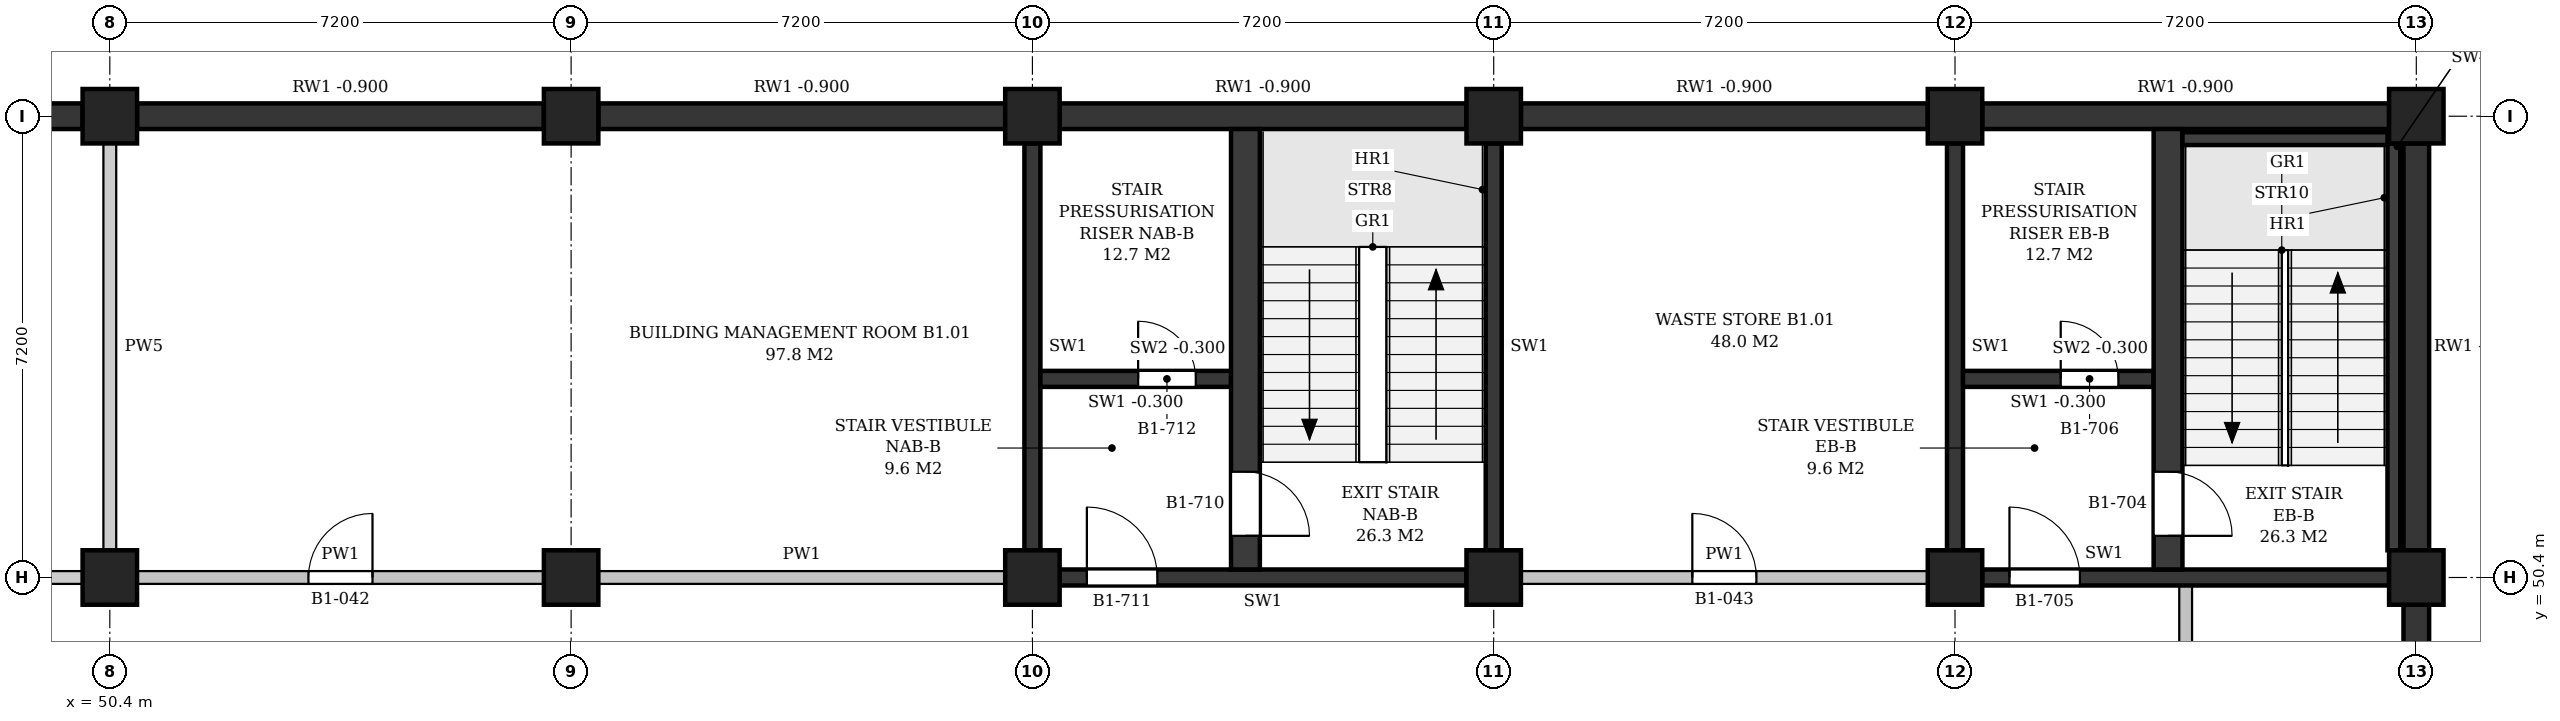
"""IFC4 building model, lengths in metres.
Left out: names, types, materials, properties, quantities, classifications, styles, units other than length and angle.
Written with IfcOpenShell. Run it as: python <this file> out.ifc"""

import sys

from ifc_helpers import new_model, si_unit, direction, frame, frame_2d, origin, origin_2d, place, context, subcontext, project, spatial, polyline, rectangle, outline, extrude, element, fill, save


model = new_model("IFC4")
c1 = context("Model", 3, precision=1e-05, world=origin(), true_north=direction((0.0, 1.0)))
c2 = subcontext(c1, "Body", "Model", "MODEL_VIEW")
j1 = project(units=[si_unit("LENGTHUNIT", "METRE"), si_unit("PLANEANGLEUNIT", "RADIAN")], contexts=[c1])
p1 = place(None, origin())
s1 = spatial("IfcSite", under=j1, at=p1, CompositionType="ELEMENT")
p2 = place(p1, origin())
s2 = spatial("IfcBuilding", under=s1, at=p2, CompositionType="ELEMENT")
p3 = place(p2, frame((0.0, 0.0, -4.5)))
s3 = spatial("IfcBuildingStorey", under=s2, at=p3, CompositionType="ELEMENT", Elevation=-4.5)
for number, where, z_axis, x_axis in (
    (1, (50.4, 50.4, 0.0), (0.0, 0.0, 1.0), (1.0, 0.0, 0.0)),
    (2, (50.4, 57.6, 0.0), (0.0, 0.0, 1.0), (1.0, 0.0, 0.0)),
    (3, (57.6, 50.4, 0.0), (0.0, 0.0, 1.0), (1.0, 0.0, 0.0)),
    (4, (57.6, 57.6, 0.0), (0.0, 0.0, 1.0), (1.0, 0.0, 0.0)),
    (5, (64.8, 50.4, 0.0), (0.0, 0.0, 1.0), (1.0, 0.0, 0.0)),
    (6, (64.8, 57.6, 0.0), (0.0, 0.0, 1.0), (1.0, 0.0, 0.0)),
    (7, (72.0, 50.4, 0.0), (0.0, 0.0, 1.0), (1.0, 0.0, 0.0)),
    (8, (72.0, 57.6, 0.0), (0.0, 0.0, 1.0), (1.0, 0.0, 0.0)),
    (9, (79.2, 50.4, 0.0), (0.0, 0.0, 1.0), (1.0, 0.0, 0.0)),
    (10, (79.2, 57.6, 0.0), (0.0, 0.0, 1.0), (1.0, 0.0, 0.0)),
    (11, (86.4, 50.4, 0.0), (0.0, 0.0, 1.0), (1.0, 0.0, 0.0)),
    (12, (86.4, 57.6, 0.0), (0.0, 0.0, 1.0), (1.0, 0.0, 0.0)),
):
    element("IfcColumn", number, at=place(p3, frame(where, z_axis=z_axis, x_axis=x_axis)), inside=s3, PredefinedType="COLUMN", context=c2, shape_type="SweptSolid", body=[
        extrude(rectangle(XDim=0.85, YDim=0.85, at=origin_2d()), origin(), (0.0, 0.0, 1.0), 4.5),
    ])
for number, where, z_axis, x_axis in (
    (13, (86.4, 43.625, 0.0), (0.0, 0.0, 1.0), (0.0, 1.0, 0.0)),
    (14, (86.4, 50.825, 0.0), (0.0, 0.0, 1.0), (0.0, 1.0, 0.0)),
    (15, (85.975, 57.6, 0.0), (0.0, 0.0, 1.0), (-1.0, 0.0, 0.0)),
):
    element("IfcWall", number, at=place(p3, frame(where, z_axis=z_axis, x_axis=x_axis)), inside=s3, PredefinedType="SOLIDWALL", context=c2, shape_type="SweptSolid", body=[
        extrude(rectangle(XDim=6.35, YDim=0.4, at=frame_2d((3.175, 0.0))), origin(), (0.0, 0.0, 1.0), 3.6),
    ])
for number, where, z_axis, x_axis in (
    (16, (78.775, 57.6, 0.0), (0.0, 0.0, 1.0), (-1.0, 0.0, 0.0)),
    (17, (71.575, 57.6, 0.0), (0.0, 0.0, 1.0), (-1.0, 0.0, 0.0)),
):
    element("IfcWall", number, at=place(p3, frame(where, z_axis=z_axis, x_axis=x_axis)), inside=s3, PredefinedType="SOLIDWALL", context=c2, shape_type="SweptSolid", body=[
        extrude(rectangle(XDim=6.35, YDim=0.4, at=frame_2d((3.175, 0.0))), origin(), (0.0, 0.0, 1.0), 3.6),
    ])
for number, where, z_axis, x_axis in (
    (18, (64.375, 57.6, 0.0), (0.0, 0.0, 1.0), (-1.0, 0.0, 0.0)),
    (19, (57.175, 57.6, 0.0), (0.0, 0.0, 1.0), (-1.0, 0.0, 0.0)),
    (20, (49.975, 57.6, 0.0), (0.0, 0.0, 1.0), (-1.0, 0.0, 0.0)),
):
    element("IfcWall", number, at=place(p3, frame(where, z_axis=z_axis, x_axis=x_axis)), inside=s3, PredefinedType="SOLIDWALL", context=c2, shape_type="SweptSolid", body=[
        extrude(rectangle(XDim=6.35, YDim=0.4, at=frame_2d((3.175, 0.0))), origin(), (0.0, 0.0, 1.0), 3.6),
    ])
p4 = place(p3, frame((79.625, 50.4, 0.0), z_axis=(0.0, 0.0, 1.0), x_axis=(1.0, 0.0, 0.0)))
e21 = element("IfcWall", 21, at=p4, inside=s3, PredefinedType="SHEAR", context=c2, shape_type="SweptSolid", body=[
    extrude(rectangle(XDim=6.35, YDim=0.25, at=frame_2d((3.175, 0.0))), origin(), (0.0, 0.0, 1.0), 3.4),
])
p5 = place(p4, frame((0.425, 0.0, 0.0)))
e22 = element("IfcOpeningElement", 22, at=p5, cuts=e21, PredefinedType="OPENING", context=c2, shape_type="SweptSolid", body=[
    extrude(rectangle(XDim=1.1, YDim=2.1, at=frame_2d((0.55, 1.05))), frame((0.0, 0.135, 0.0), z_axis=(0.0, -1.0, 0.0), x_axis=(1.0, 0.0, 0.0)), (0.0, 0.0, 1.0), 0.27),
])
p6 = place(p3, frame((79.2, 50.825, 0.0), z_axis=(0.0, 0.0, 1.0), x_axis=(0.0, 1.0, 0.0)))
e23 = element("IfcWall", 23, at=p6, inside=s3, PredefinedType="SHEAR", context=c2, shape_type="SweptSolid", body=[
    extrude(rectangle(XDim=6.35, YDim=0.25, at=frame_2d((3.175, 0.0))), origin(), (0.0, 0.0, 1.0), 3.4),
])
p7 = place(p3, frame((86.05, 50.825, 0.0), z_axis=(0.0, 0.0, 1.0), x_axis=(0.0, 1.0, 0.0)))
e24 = element("IfcWall", 24, at=p7, inside=s3, PredefinedType="SHEAR", context=c2, shape_type="SweptSolid", body=[
    extrude(rectangle(XDim=6.35, YDim=0.2, at=frame_2d((3.175, 0.0))), origin(), (0.0, 0.0, 1.0), 4.2),
])
p8 = place(p3, frame((82.75, 57.25, 0.0), z_axis=(0.0, 0.0, 1.0), x_axis=(1.0, 0.0, 0.0)))
e25 = element("IfcWall", 25, at=p8, inside=s3, PredefinedType="SHEAR", context=c2, shape_type="SweptSolid", body=[
    extrude(rectangle(XDim=3.2, YDim=0.2, at=frame_2d((1.6, 0.0))), origin(), (0.0, 0.0, 1.0), 4.2),
])
p9 = place(p3, frame((82.525, 50.525, 0.0), z_axis=(0.0, 0.0, 1.0), x_axis=(0.0, 1.0, 0.0)))
e26 = element("IfcWall", 26, at=p9, inside=s3, PredefinedType="SHEAR", context=c2, shape_type="SweptSolid", body=[
    extrude(rectangle(XDim=6.875, YDim=0.45, at=frame_2d((3.438, 0.0))), origin(), (0.0, 0.0, 1.0), 4.2),
])
p10 = place(p9, frame((0.525, 0.0, 0.0)))
e27 = element("IfcOpeningElement", 27, at=p10, cuts=e26, PredefinedType="OPENING", context=c2, shape_type="SweptSolid", body=[
    extrude(rectangle(XDim=1.0, YDim=2.1, at=frame_2d((0.5, 1.05))), frame((0.0, 0.235, 0.0), z_axis=(0.0, -1.0, 0.0), x_axis=(1.0, 0.0, 0.0)), (0.0, 0.0, 1.0), 0.47),
])
p11 = place(p3, frame((79.325, 53.5, 0.0), z_axis=(0.0, 0.0, 1.0), x_axis=(1.0, 0.0, 0.0)))
e28 = element("IfcWall", 28, at=p11, inside=s3, PredefinedType="SHEAR", context=c2, shape_type="SweptSolid", body=[
    extrude(rectangle(XDim=2.975, YDim=0.25, at=frame_2d((1.488, 0.0))), origin(), (0.0, 0.0, 1.0), 4.2),
])
p12 = place(p11, frame((1.525, 0.0, 0.0)))
e29 = element("IfcOpeningElement", 29, at=p12, cuts=e28, PredefinedType="OPENING", context=c2, shape_type="SweptSolid", body=[
    extrude(rectangle(XDim=0.9, YDim=2.1, at=frame_2d((0.45, 1.05))), frame((0.0, 0.135, 0.0), z_axis=(0.0, -1.0, 0.0), x_axis=(1.0, 0.0, 0.0)), (0.0, 0.0, 1.0), 0.27),
])
p13 = place(p3, frame((65.225, 50.4, 0.0), z_axis=(0.0, 0.0, 1.0), x_axis=(1.0, 0.0, 0.0)))
e30 = element("IfcWall", 30, at=p13, inside=s3, PredefinedType="SHEAR", context=c2, shape_type="SweptSolid", body=[
    extrude(rectangle(XDim=6.35, YDim=0.25, at=frame_2d((3.175, 0.0))), origin(), (0.0, 0.0, 1.0), 3.4),
])
p14 = place(p13, frame((0.425, 0.0, 0.0)))
e31 = element("IfcOpeningElement", 31, at=p14, cuts=e30, PredefinedType="OPENING", context=c2, shape_type="SweptSolid", body=[
    extrude(rectangle(XDim=1.1, YDim=2.1, at=frame_2d((0.55, 1.05))), frame((0.0, 0.135, 0.0), z_axis=(0.0, -1.0, 0.0), x_axis=(1.0, 0.0, 0.0)), (0.0, 0.0, 1.0), 0.27),
])
for number, where, z_axis, x_axis in (
    (32, (72.0, 50.825, 0.0), (0.0, 0.0, 1.0), (0.0, 1.0, 0.0)),
    (33, (64.8, 50.825, 0.0), (0.0, 0.0, 1.0), (0.0, 1.0, 0.0)),
):
    element("IfcWall", number, at=place(p3, frame(where, z_axis=z_axis, x_axis=x_axis)), inside=s3, PredefinedType="SHEAR", context=c2, shape_type="SweptSolid", body=[
        extrude(rectangle(XDim=6.35, YDim=0.25, at=frame_2d((3.175, 0.0))), origin(), (0.0, 0.0, 1.0), 3.4),
    ])
p15 = place(p3, frame((68.125, 50.525, 0.0), z_axis=(0.0, 0.0, 1.0), x_axis=(0.0, 1.0, 0.0)))
e34 = element("IfcWall", 34, at=p15, inside=s3, PredefinedType="SHEAR", context=c2, shape_type="SweptSolid", body=[
    extrude(rectangle(XDim=6.875, YDim=0.45, at=frame_2d((3.438, 0.0))), origin(), (0.0, 0.0, 1.0), 4.2),
])
p16 = place(p15, frame((0.525, 0.0, 0.0)))
e35 = element("IfcOpeningElement", 35, at=p16, cuts=e34, PredefinedType="OPENING", context=c2, shape_type="SweptSolid", body=[
    extrude(rectangle(XDim=1.0, YDim=2.1, at=frame_2d((0.5, 1.05))), frame((0.0, 0.235, 0.0), z_axis=(0.0, -1.0, 0.0), x_axis=(1.0, 0.0, 0.0)), (0.0, 0.0, 1.0), 0.47),
])
p17 = place(p3, frame((64.925, 53.5, 0.0), z_axis=(0.0, 0.0, 1.0), x_axis=(1.0, 0.0, 0.0)))
e36 = element("IfcWall", 36, at=p17, inside=s3, PredefinedType="SHEAR", context=c2, shape_type="SweptSolid", body=[
    extrude(rectangle(XDim=2.975, YDim=0.25, at=frame_2d((1.487, 0.0))), origin(), (0.0, 0.0, 1.0), 4.2),
])
p18 = place(p17, frame((1.525, 0.0, 0.0)))
e37 = element("IfcOpeningElement", 37, at=p18, cuts=e36, PredefinedType="OPENING", context=c2, shape_type="SweptSolid", body=[
    extrude(rectangle(XDim=0.9, YDim=2.1, at=frame_2d((0.45, 1.05))), frame((0.0, 0.135, 0.0), z_axis=(0.0, -1.0, 0.0), x_axis=(1.0, 0.0, 0.0)), (0.0, 0.0, 1.0), 0.27),
])
p19 = place(p3, frame((43.625, 50.4, 0.0), z_axis=(0.0, 0.0, 1.0), x_axis=(1.0, 0.0, 0.0)))
e38 = element("IfcWall", 38, at=p19, inside=s3, PredefinedType="SOLIDWALL", context=c2, shape_type="SweptSolid", body=[
    extrude(rectangle(XDim=6.35, YDim=0.2, at=frame_2d((3.175, 0.0))), origin(), (0.0, 0.0, 1.0), 3.4),
])
p20 = place(p19, frame((2.725, 0.0, 0.0)))
e39 = element("IfcOpeningElement", 39, at=p20, cuts=e38, PredefinedType="OPENING", context=c2, shape_type="SweptSolid", body=[
    extrude(rectangle(XDim=0.9, YDim=2.1, at=frame_2d((0.45, 1.05))), frame((0.0, 0.11, 0.0), z_axis=(0.0, -1.0, 0.0), x_axis=(1.0, 0.0, 0.0)), (0.0, 0.0, 1.0), 0.22),
])
p21 = place(p3, frame((50.825, 50.4, 0.0), z_axis=(0.0, 0.0, 1.0), x_axis=(1.0, 0.0, 0.0)))
e40 = element("IfcWall", 40, at=p21, inside=s3, PredefinedType="PARTITIONING", context=c2, shape_type="SweptSolid", body=[
    extrude(rectangle(XDim=6.35, YDim=0.2, at=frame_2d((3.175, 0.0))), origin(), (0.0, 0.0, 1.0), 3.4),
])
p22 = place(p21, frame((2.675, 0.0, 0.0)))
e41 = element("IfcOpeningElement", 41, at=p22, cuts=e40, PredefinedType="OPENING", context=c2, shape_type="SweptSolid", body=[
    extrude(rectangle(XDim=1.0, YDim=2.1, at=frame_2d((0.5, 1.05))), frame((0.0, 0.11, 0.0), z_axis=(0.0, -1.0, 0.0), x_axis=(1.0, 0.0, 0.0)), (0.0, 0.0, 1.0), 0.22),
])
p23 = place(p3, frame((58.025, 50.4, 0.0), z_axis=(0.0, 0.0, 1.0), x_axis=(1.0, 0.0, 0.0)))
e42 = element("IfcWall", 42, at=p23, inside=s3, PredefinedType="PARTITIONING", context=c2, shape_type="SweptSolid", body=[
    extrude(rectangle(XDim=6.35, YDim=0.2, at=frame_2d((3.175, 0.0))), origin(), (0.0, 0.0, 1.0), 3.4),
])
p24 = place(p3, frame((72.425, 50.4, 0.0), z_axis=(0.0, 0.0, 1.0), x_axis=(1.0, 0.0, 0.0)))
e43 = element("IfcWall", 43, at=p24, inside=s3, PredefinedType="PARTITIONING", context=c2, shape_type="SweptSolid", body=[
    extrude(rectangle(XDim=6.35, YDim=0.2, at=frame_2d((3.175, 0.0))), origin(), (0.0, 0.0, 1.0), 3.4),
])
p25 = place(p24, frame((2.675, 0.0, 0.0)))
e44 = element("IfcOpeningElement", 44, at=p25, cuts=e43, PredefinedType="OPENING", context=c2, shape_type="SweptSolid", body=[
    extrude(rectangle(XDim=1.0, YDim=2.1, at=frame_2d((0.5, 1.05))), frame((0.0, 0.11, 0.0), z_axis=(0.0, -1.0, 0.0), x_axis=(1.0, 0.0, 0.0)), (0.0, 0.0, 1.0), 0.22),
])
p26 = place(p3, frame((50.4, 50.825, 0.0), z_axis=(0.0, 0.0, 1.0), x_axis=(0.0, 1.0, 0.0)))
e45 = element("IfcWall", 45, at=p26, inside=s3, PredefinedType="SOLIDWALL", context=c2, shape_type="SweptSolid", body=[
    extrude(rectangle(XDim=6.35, YDim=0.2, at=frame_2d((3.175, 0.0))), origin(), (0.0, 0.0, 1.0), 3.4),
])
p27 = place(p3, frame((82.8, 43.2, 0.0), z_axis=(0.0, 0.0, 1.0), x_axis=(0.0, 1.0, 0.0)))
e46 = element("IfcWall", 46, at=p27, inside=s3, PredefinedType="PARTITIONING", context=c2, shape_type="SweptSolid", body=[
    extrude(outline(polyline([(0.0, 0.0), (7.075, 0.0), (7.075, 3.4), (6.9, 3.4), (6.9, 4.2), (0.3, 4.2), (0.3, 3.4), (0.0, 3.4), (0.0, 0.0)])), frame((0.0, 0.1, 0.0), z_axis=(0.0, -1.0, 0.0), x_axis=(1.0, 0.0, 0.0)), (0.0, 0.0, 1.0), 0.2),
])
p28 = place(p27, frame((3.038, 0.0, 0.0)))
e47 = element("IfcOpeningElement", 47, at=p28, cuts=e46, PredefinedType="OPENING", context=c2, shape_type="SweptSolid", body=[
    extrude(rectangle(XDim=1.0, YDim=2.1, at=frame_2d((0.5, 1.05))), frame((0.0, 0.11, 0.0), z_axis=(0.0, -1.0, 0.0), x_axis=(1.0, 0.0, 0.0)), (0.0, 0.0, 1.0), 0.22),
])
p29 = place(p10, frame((1.0, 0.0, 0.0), z_axis=(0.0, 0.0, 1.0), x_axis=(-1.0, 0.0, 0.0)))
e48 = element("IfcDoor", 48, at=p29, inside=s3, OperationType="SINGLE_SWING_RIGHT", PredefinedType="DOOR", context=c2, shape_type="SweptSolid", body=[
    extrude(rectangle(XDim=1.0, YDim=2.1, at=frame_2d((0.5, 1.05))), frame((0.0, 0.025, 0.0), z_axis=(0.0, -1.0, 0.0), x_axis=(1.0, 0.0, 0.0)), (0.0, 0.0, 1.0), 0.05),
])
fill(e27, e48)
p30 = place(p5, origin())
e49 = element("IfcDoor", 49, at=p30, inside=s3, OperationType="SINGLE_SWING_LEFT", PredefinedType="DOOR", context=c2, shape_type="SweptSolid", body=[
    extrude(rectangle(XDim=1.1, YDim=2.1, at=frame_2d((0.55, 1.05))), frame((0.0, 0.025, 0.0), z_axis=(0.0, -1.0, 0.0), x_axis=(1.0, 0.0, 0.0)), (0.0, 0.0, 1.0), 0.05),
])
fill(e22, e49)
p31 = place(p12, origin())
e50 = element("IfcDoor", 50, at=p31, inside=s3, OperationType="SINGLE_SWING_LEFT", PredefinedType="DOOR", context=c2, shape_type="SweptSolid", body=[
    extrude(rectangle(XDim=0.9, YDim=2.1, at=frame_2d((0.45, 1.05))), frame((0.0, 0.025, 0.0), z_axis=(0.0, -1.0, 0.0), x_axis=(1.0, 0.0, 0.0)), (0.0, 0.0, 1.0), 0.05),
])
fill(e29, e50)
p32 = place(p16, frame((1.0, 0.0, 0.0), z_axis=(0.0, 0.0, 1.0), x_axis=(-1.0, 0.0, 0.0)))
e51 = element("IfcDoor", 51, at=p32, inside=s3, OperationType="SINGLE_SWING_RIGHT", PredefinedType="DOOR", context=c2, shape_type="SweptSolid", body=[
    extrude(rectangle(XDim=1.0, YDim=2.1, at=frame_2d((0.5, 1.05))), frame((0.0, 0.025, 0.0), z_axis=(0.0, -1.0, 0.0), x_axis=(1.0, 0.0, 0.0)), (0.0, 0.0, 1.0), 0.05),
])
fill(e35, e51)
p33 = place(p14, origin())
e52 = element("IfcDoor", 52, at=p33, inside=s3, OperationType="SINGLE_SWING_LEFT", PredefinedType="DOOR", context=c2, shape_type="SweptSolid", body=[
    extrude(rectangle(XDim=1.1, YDim=2.1, at=frame_2d((0.55, 1.05))), frame((0.0, 0.025, 0.0), z_axis=(0.0, -1.0, 0.0), x_axis=(1.0, 0.0, 0.0)), (0.0, 0.0, 1.0), 0.05),
])
fill(e31, e52)
p34 = place(p18, origin())
e53 = element("IfcDoor", 53, at=p34, inside=s3, OperationType="SINGLE_SWING_LEFT", PredefinedType="DOOR", context=c2, shape_type="SweptSolid", body=[
    extrude(rectangle(XDim=0.9, YDim=2.1, at=frame_2d((0.45, 1.05))), frame((0.0, 0.025, 0.0), z_axis=(0.0, -1.0, 0.0), x_axis=(1.0, 0.0, 0.0)), (0.0, 0.0, 1.0), 0.05),
])
fill(e37, e53)
p35 = place(p22, origin())
e54 = element("IfcDoor", 54, at=p35, inside=s3, OperationType="SINGLE_SWING_RIGHT", PredefinedType="DOOR", context=c2, shape_type="SweptSolid", body=[
    extrude(rectangle(XDim=1.0, YDim=2.1, at=frame_2d((0.5, 1.05))), frame((0.0, 0.025, 0.0), z_axis=(0.0, -1.0, 0.0), x_axis=(1.0, 0.0, 0.0)), (0.0, 0.0, 1.0), 0.05),
])
fill(e41, e54)
p36 = place(p25, origin())
e55 = element("IfcDoor", 55, at=p36, inside=s3, OperationType="SINGLE_SWING_LEFT", PredefinedType="DOOR", context=c2, shape_type="SweptSolid", body=[
    extrude(rectangle(XDim=1.0, YDim=2.1, at=frame_2d((0.5, 1.05))), frame((0.0, 0.025, 0.0), z_axis=(0.0, -1.0, 0.0), x_axis=(1.0, 0.0, 0.0)), (0.0, 0.0, 1.0), 0.05),
])
fill(e44, e55)
save(model, sys.argv[1])
